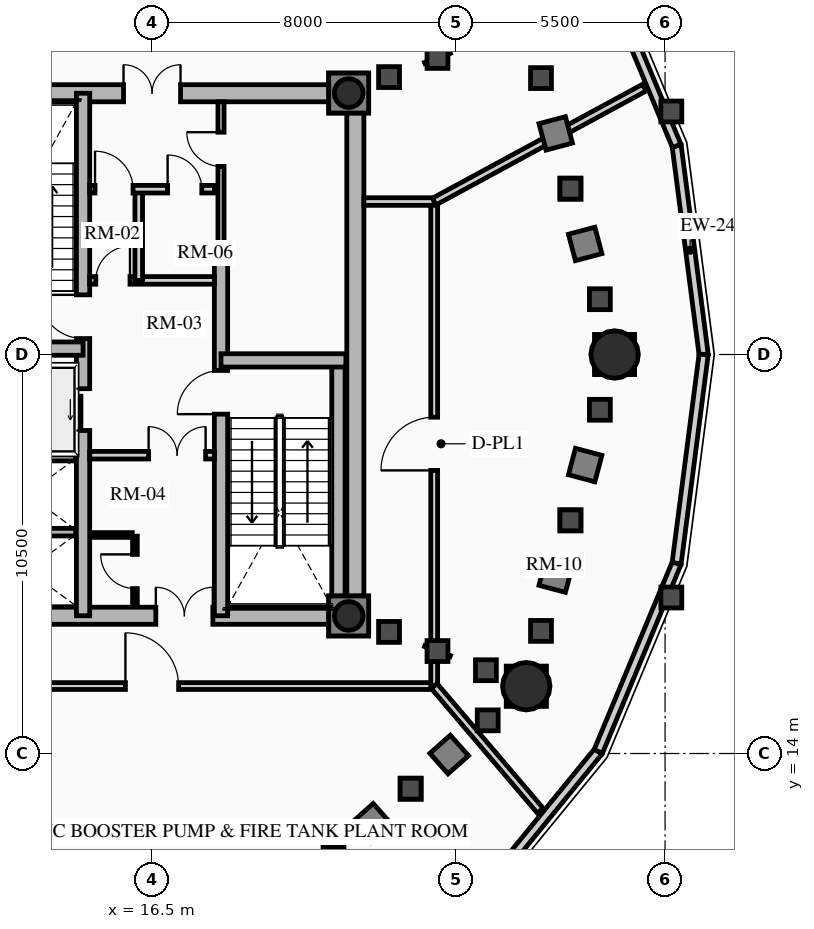
"""IFC4 building model, lengths in metres.
Left out: names, types, materials, properties, quantities, classifications, styles, units other than length and angle.
Written with IfcOpenShell. Run it as: python <this file> out.ifc"""

import sys

from ifc_helpers import new_model, si_unit, direction, frame, frame_2d, origin, origin_2d, place, context, subcontext, project, spatial, rectangle, circle, hollow_circle, extrude, source, transform, mapped, element, fill, save


model = new_model("IFC4")
c1 = context("Model", 3, precision=1e-05, world=origin(), true_north=direction((0.0, 1.0)))
c2 = subcontext(c1, "Body", "Model", "MODEL_VIEW")
j1 = project(units=[si_unit("LENGTHUNIT", "METRE"), si_unit("PLANEANGLEUNIT", "RADIAN")], contexts=[c1])
p1 = place(None, origin())
s1 = spatial("IfcSite", under=j1, at=p1, CompositionType="ELEMENT")
p2 = place(p1, origin())
s2 = spatial("IfcBuilding", under=s1, at=p2, CompositionType="ELEMENT")
p3 = place(p2, frame((0.0, 0.0, 147.1)))
s3 = spatial("IfcBuildingStorey", under=s2, at=p3, CompositionType="ELEMENT", Elevation=147.1)
p4 = place(p3, frame((21.85, 17.4, 0.0), z_axis=(0.0, 0.0, 1.0), x_axis=(0.0, 1.0, 0.0)))
e1 = element("IfcWall", 1, at=p4, inside=s3, PredefinedType="SHEAR", context=c2, shape_type="SweptSolid", body=[
    extrude(rectangle(XDim=14.2, YDim=0.45, at=frame_2d((7.1, 0.0))), origin(), (0.0, 0.0, 1.0), 4.5),
])
p5 = place(p3, frame((11.15, 17.625, 0.0), z_axis=(0.0, 0.0, 1.0), x_axis=(1.0, 0.0, 0.0)))
e2 = element("IfcWall", 2, at=p5, inside=s3, PredefinedType="SHEAR", context=c2, shape_type="SweptSolid", body=[
    extrude(rectangle(XDim=10.7, YDim=0.45, at=frame_2d((5.35, 0.0))), origin(), (0.0, 0.0, 1.0), 4.5),
])
m1 = source(origin(), c2, "Body", "SweptSolid", [
    extrude(rectangle(XDim=1.5, YDim=2.02, at=frame_2d((0.75, 1.01))), frame((0.0, 0.235, 0.0), z_axis=(0.0, -1.0, 0.0), x_axis=(1.0, 0.0, 0.0)), (0.0, 0.0, 1.0), 0.47),
])
p6 = place(p5, frame((5.45, 0.0, 0.0)))
e3 = element("IfcOpeningElement", 3, at=p6, cuts=e2, PredefinedType="OPENING", context=c2, shape_type="MappedRepresentation", body=[
    mapped(m1, transform((0.0, 0.0, 0.0), x_axis=(1.0, 0.0, 0.0), y_axis=(0.0, 1.0, 0.0), z_axis=(0.0, 0.0, 1.0), scale=1.0)),
])
p7 = place(p3, frame((11.15, 31.375, 0.0), z_axis=(0.0, 0.0, 1.0), x_axis=(1.0, 0.0, 0.0)))
e4 = element("IfcWall", 4, at=p7, inside=s3, PredefinedType="SHEAR", context=c2, shape_type="SweptSolid", body=[
    extrude(rectangle(XDim=10.7, YDim=0.45, at=frame_2d((5.35, 0.0))), origin(), (0.0, 0.0, 1.0), 4.5),
])
p8 = place(p7, frame((4.6, 0.0, 0.0)))
e5 = element("IfcOpeningElement", 5, at=p8, cuts=e4, PredefinedType="OPENING", context=c2, shape_type="MappedRepresentation", body=[
    mapped(m1, transform((0.0, 0.0, 0.0), x_axis=(1.0, 0.0, 0.0), y_axis=(0.0, 1.0, 0.0), z_axis=(0.0, 0.0, 1.0), scale=1.0)),
])
p9 = place(p3, frame((14.685, 17.625, 0.0), z_axis=(0.0, 0.0, 1.0), x_axis=(0.0, 1.0, 0.0)))
e6 = element("IfcWall", 6, at=p9, inside=s3, PredefinedType="SHEAR", context=c2, shape_type="SweptSolid", body=[
    extrude(rectangle(XDim=13.75, YDim=0.35, at=frame_2d((6.875, 0.0))), origin(), (0.0, 0.0, 1.0), 4.5),
])
m2 = source(origin(), c2, "Body", "SweptSolid", [
    extrude(rectangle(XDim=1.1, YDim=2.015, at=frame_2d((0.55, 1.007))), frame((0.0, 0.185, 0.0), z_axis=(0.0, -1.0, 0.0), x_axis=(1.0, 0.0, 0.0)), (0.0, 0.0, 1.0), 0.37),
])
p10 = place(p9, frame((4.875, 0.0, 0.0)))
e7 = element("IfcOpeningElement", 7, at=p10, cuts=e6, PredefinedType="OPENING", context=c2, shape_type="MappedRepresentation", body=[
    mapped(m2, transform((0.0, 0.0, 0.0), x_axis=(1.0, 0.0, 0.0), y_axis=(0.0, 1.0, 0.0), z_axis=(0.0, 0.0, 1.0), scale=1.0)),
])
m3 = source(origin(), c2, "Body", "SweptSolid", [
    extrude(rectangle(XDim=1.15, YDim=2.02, at=frame_2d((0.575, 1.01))), frame((0.0, 0.185, 0.0), z_axis=(0.0, -1.0, 0.0), x_axis=(1.0, 0.0, 0.0)), (0.0, 0.0, 1.0), 0.37),
])
p11 = place(p9, frame((7.295, 0.0, 0.0)))
e8 = element("IfcOpeningElement", 8, at=p11, cuts=e6, PredefinedType="OPENING", context=c2, shape_type="MappedRepresentation", body=[
    mapped(m3, transform((0.0, 0.0, 0.0), x_axis=(1.0, 0.0, 0.0), y_axis=(0.0, 1.0, 0.0), z_axis=(0.0, 0.0, 1.0), scale=1.0)),
])
p12 = place(p3, frame((18.315, 17.625, 0.0), z_axis=(0.0, 0.0, 1.0), x_axis=(0.0, 1.0, 0.0)))
e9 = element("IfcWall", 9, at=p12, inside=s3, PredefinedType="SHEAR", context=c2, shape_type="SweptSolid", body=[
    extrude(rectangle(XDim=9.625, YDim=0.35, at=frame_2d((4.812, 0.0))), origin(), (0.0, 0.0, 1.0), 4.5),
])
p13 = place(p12, frame((5.305, 0.0, 0.0)))
e10 = element("IfcOpeningElement", 10, at=p13, cuts=e9, PredefinedType="OPENING", context=c2, shape_type="MappedRepresentation", body=[
    mapped(m3, transform((0.0, 0.0, 0.0), x_axis=(1.0, 0.0, 0.0), y_axis=(0.0, 1.0, 0.0), z_axis=(0.0, 0.0, 1.0), scale=1.0)),
])
p14 = place(p3, frame((11.4, 24.655, 0.0), z_axis=(0.0, 0.0, 1.0), x_axis=(1.0, 0.0, 0.0)))
e11 = element("IfcWall", 11, at=p14, inside=s3, PredefinedType="SHEAR", context=c2, shape_type="SweptSolid", body=[
    extrude(rectangle(XDim=3.285, YDim=0.35, at=frame_2d((1.643, 0.0))), origin(), (0.0, 0.0, 1.0), 4.5),
])
p15 = place(p3, frame((21.405, 17.625, 0.0), z_axis=(0.0, 0.0, 1.0), x_axis=(0.0, 1.0, 0.0)))
e12 = element("IfcWall", 12, at=p15, inside=s3, PredefinedType="SHEAR", context=c2, shape_type="SweptSolid", body=[
    extrude(rectangle(XDim=6.72, YDim=0.35, at=frame_2d((3.36, 0.0))), origin(), (0.0, 0.0, 1.0), 4.5),
])
p16 = place(p3, frame((18.315, 24.345, 0.0), z_axis=(0.0, 0.0, 1.0), x_axis=(1.0, 0.0, 0.0)))
e13 = element("IfcWall", 13, at=p16, inside=s3, PredefinedType="SHEAR", context=c2, shape_type="SweptSolid", body=[
    extrude(rectangle(XDim=3.285, YDim=0.35, at=frame_2d((1.643, 0.0))), origin(), (0.0, 0.0, 1.0), 4.5),
])
for number, where, z_axis, x_axis in (
    (14, (21.675, 17.62, 0.0), (0.0, 0.0, 1.0), (1.0, 0.0, 0.0)),
    (15, (21.675, 31.38, 0.0), (0.0, 0.0, 1.0), (1.0, 0.0, 0.0)),
):
    element("IfcColumn", number, at=place(p3, frame(where, z_axis=z_axis, x_axis=x_axis)), inside=s3, PredefinedType="COLUMN", context=c2, shape_type="SweptSolid", body=[
        extrude(hollow_circle(Radius=0.38, WallThickness=0.032, at=origin_2d()), origin(), (0.0, 0.0, 1.0), 4.5),
    ])
for number, where, z_axis, x_axis in (
    (16, (28.672, 24.5, 0.0), (0.0, 0.0, 1.0), (1.0, 0.0, 0.0)),
    (17, (26.347, 15.771, 0.0), (0.0, 0.0, 1.0), (1.0, 0.0, 0.0)),
):
    element("IfcColumn", number, at=place(p3, frame(where, z_axis=z_axis, x_axis=x_axis)), inside=s3, PredefinedType="USERDEFINED", context=c2, shape_type="SweptSolid", body=[
        extrude(circle(Radius=0.625, at=origin_2d()), origin(), (0.0, 0.0, 1.0), 4.5),
    ])
p17 = place(p3, frame((30.305, 29.991, 0.0), z_axis=(0.0, 0.0, 1.0), x_axis=(0.128266533912, -0.991739732126, 0.0)))
e18 = element("IfcWall", 18, at=p17, inside=s3, PredefinedType="SOLIDWALL", context=c2, shape_type="SweptSolid", body=[
    extrude(rectangle(XDim=5.537, YDim=0.24, at=frame_2d((2.769, 0.0))), origin(), (0.0, 0.0, 1.0), 3.636),
])
p18 = place(p3, frame((28.243, 34.945, 0.0), z_axis=(0.0, 0.0, 1.0), x_axis=(0.384259959969, -0.923224936386, 0.0)))
e19 = element("IfcWall", 19, at=p18, inside=s3, PredefinedType="SOLIDWALL", context=c2, shape_type="SweptSolid", body=[
    extrude(rectangle(XDim=5.365, YDim=0.24, at=frame_2d((2.683, 0.0))), origin(), (0.0, 0.0, 1.0), 3.636),
])
p19 = place(p3, frame((28.243, 14.055, 0.0), z_axis=(0.0, 0.0, 1.0), x_axis=(-0.632598524901, -0.774479894053, 0.0)))
e20 = element("IfcWall", 20, at=p19, inside=s3, PredefinedType="SOLIDWALL", context=c2, shape_type="SweptSolid", body=[
    extrude(rectangle(XDim=5.076, YDim=0.24, at=frame_2d((2.538, 0.0))), origin(), (0.0, 0.0, 1.0), 3.636),
])
p20 = place(p3, frame((30.305, 19.009, 0.0), z_axis=(0.0, 0.0, 1.0), x_axis=(-0.384259959969, -0.923224936386, 0.0)))
e21 = element("IfcWall", 21, at=p20, inside=s3, PredefinedType="SOLIDWALL", context=c2, shape_type="SweptSolid", body=[
    extrude(rectangle(XDim=5.365, YDim=0.24, at=frame_2d((2.683, 0.0))), origin(), (0.0, 0.0, 1.0), 3.636),
])
p21 = place(p3, frame((31.015, 24.5, 0.0), z_axis=(0.0, 0.0, 1.0), x_axis=(-0.128266533912, -0.991739732126, 0.0)))
e22 = element("IfcWall", 22, at=p21, inside=s3, PredefinedType="SOLIDWALL", context=c2, shape_type="SweptSolid", body=[
    extrude(rectangle(XDim=5.537, YDim=0.24, at=frame_2d((2.769, 0.0))), origin(), (0.0, 0.0, 1.0), 3.636),
])
for number, where, z_axis, x_axis in (
    (23, (11.52, 21.8, 0.0), (0.0, 0.0, 1.0), (1.0, 0.0, 0.0)),
    (24, (11.52, 19.825, 0.0), (0.0, 0.0, 1.0), (1.0, 0.0, 0.0)),
):
    element("IfcWall", number, at=place(p3, frame(where, z_axis=z_axis, x_axis=x_axis)), inside=s3, PredefinedType="SHEAR", context=c2, shape_type="SweptSolid", body=[
        extrude(rectangle(XDim=2.97, YDim=0.2, at=frame_2d((1.485, 0.0))), origin(), (0.0, 0.0, 1.0), 4.5),
    ])
p22 = place(p3, frame((14.86, 21.85, 0.0), z_axis=(0.0, 0.0, 1.0), x_axis=(1.0, 0.0, 0.0)))
e25 = element("IfcWall", 25, at=p22, inside=s3, PredefinedType="PARTITIONING", context=c2, shape_type="SweptSolid", body=[
    extrude(rectangle(XDim=3.28, YDim=0.2, at=frame_2d((1.64, 0.0))), origin(), (0.0, 0.0, 1.0), 4.265),
])
m4 = source(origin(), c2, "Body", "SweptSolid", [
    extrude(rectangle(XDim=1.5, YDim=2.02, at=frame_2d((0.75, 1.01))), frame((0.0, 0.11, 0.0), z_axis=(0.0, -1.0, 0.0), x_axis=(1.0, 0.0, 0.0)), (0.0, 0.0, 1.0), 0.22),
])
p23 = place(p22, frame((1.55, 0.0, 0.0)))
e26 = element("IfcOpeningElement", 26, at=p23, cuts=e25, PredefinedType="OPENING", context=c2, shape_type="MappedRepresentation", body=[
    mapped(m4, transform((0.0, 0.0, 0.0), x_axis=(1.0, 0.0, 0.0), y_axis=(0.0, 1.0, 0.0), z_axis=(0.0, 0.0, 1.0), scale=1.0)),
])
p24 = place(p3, frame((14.86, 26.45, 0.0), z_axis=(0.0, 0.0, 1.0), x_axis=(1.0, 0.0, 0.0)))
e27 = element("IfcWall", 27, at=p24, inside=s3, PredefinedType="PARTITIONING", context=c2, shape_type="SweptSolid", body=[
    extrude(rectangle(XDim=3.28, YDim=0.2, at=frame_2d((1.64, 0.0))), origin(), (0.0, 0.0, 1.0), 4.265),
])
m5 = source(origin(), c2, "Body", "SweptSolid", [
    extrude(rectangle(XDim=0.9, YDim=2.005, at=frame_2d((0.45, 1.002))), frame((0.0, 0.11, 0.0), z_axis=(0.0, -1.0, 0.0), x_axis=(1.0, 0.0, 0.0)), (0.0, 0.0, 1.0), 0.22),
])
p25 = place(p24, frame((0.16, 0.0, 0.0)))
e28 = element("IfcOpeningElement", 28, at=p25, cuts=e27, PredefinedType="OPENING", context=c2, shape_type="MappedRepresentation", body=[
    mapped(m5, transform((0.0, 0.0, 0.0), x_axis=(1.0, 0.0, 0.0), y_axis=(0.0, 1.0, 0.0), z_axis=(0.0, 0.0, 1.0), scale=1.0)),
])
p26 = place(p3, frame((16.15, 26.45, 0.0), z_axis=(0.0, 0.0, 1.0), x_axis=(0.0, 1.0, 0.0)))
e29 = element("IfcWall", 29, at=p26, inside=s3, PredefinedType="PARTITIONING", context=c2, shape_type="SweptSolid", body=[
    extrude(rectangle(XDim=2.4, YDim=0.2, at=frame_2d((1.2, 0.0))), origin(), (0.0, 0.0, 1.0), 4.265),
])
p27 = place(p3, frame((14.86, 28.85, 0.0), z_axis=(0.0, 0.0, 1.0), x_axis=(1.0, 0.0, 0.0)))
e30 = element("IfcWall", 30, at=p27, inside=s3, PredefinedType="PARTITIONING", context=c2, shape_type="SweptSolid", body=[
    extrude(rectangle(XDim=3.28, YDim=0.2, at=frame_2d((1.64, 0.0))), origin(), (0.0, 0.0, 1.0), 4.265),
])
m6 = source(origin(), c2, "Body", "SweptSolid", [
    extrude(rectangle(XDim=1.0, YDim=2.015, at=frame_2d((0.5, 1.007))), frame((0.0, 0.11, 0.0), z_axis=(0.0, -1.0, 0.0), x_axis=(1.0, 0.0, 0.0)), (0.0, 0.0, 1.0), 0.22),
])
p28 = place(p27, frame((0.14, 0.0, 0.0)))
e31 = element("IfcOpeningElement", 31, at=p28, cuts=e30, PredefinedType="OPENING", context=c2, shape_type="MappedRepresentation", body=[
    mapped(m6, transform((0.0, 0.0, 0.0), x_axis=(1.0, 0.0, 0.0), y_axis=(0.0, 1.0, 0.0), z_axis=(0.0, 0.0, 1.0), scale=1.0)),
])
p29 = place(p27, frame((2.05, 0.0, 0.0)))
e32 = element("IfcOpeningElement", 32, at=p29, cuts=e30, PredefinedType="OPENING", context=c2, shape_type="MappedRepresentation", body=[
    mapped(m5, transform((0.0, 0.0, 0.0), x_axis=(1.0, 0.0, 0.0), y_axis=(0.0, 1.0, 0.0), z_axis=(0.0, 0.0, 1.0), scale=1.0)),
])
p30 = place(p3, frame((16.05, 17.92, 0.0), z_axis=(0.0, 0.0, 1.0), x_axis=(0.0, 1.0, 0.0)))
e33 = element("IfcWall", 33, at=p30, inside=s3, PredefinedType="PARTITIONING", context=c2, shape_type="SweptSolid", body=[
    extrude(rectangle(XDim=1.8, YDim=0.125, at=frame_2d((0.9, 0.0))), origin(), (0.0, 0.0, 1.0), 4.265),
])
m7 = source(origin(), c2, "Body", "SweptSolid", [
    extrude(rectangle(XDim=0.9, YDim=2.005, at=frame_2d((0.45, 1.002))), frame((0.0, 0.073, 0.0), z_axis=(0.0, -1.0, 0.0), x_axis=(1.0, 0.0, 0.0)), (0.0, 0.0, 1.0), 0.145),
])
p31 = place(p30, frame((0.42, 0.0, 0.0)))
e34 = element("IfcOpeningElement", 34, at=p31, cuts=e33, PredefinedType="OPENING", context=c2, shape_type="MappedRepresentation", body=[
    mapped(m7, transform((0.0, 0.0, 0.0), x_axis=(1.0, 0.0, 0.0), y_axis=(0.0, 1.0, 0.0), z_axis=(0.0, 0.0, 1.0), scale=1.0)),
])
p32 = place(p3, frame((14.88, 19.75, 0.0), z_axis=(0.0, 0.0, 1.0), x_axis=(1.0, 0.0, 0.0)))
e35 = element("IfcWall", 35, at=p32, inside=s3, PredefinedType="PARTITIONING", context=c2, shape_type="SweptSolid", body=[
    extrude(rectangle(XDim=1.1, YDim=0.125, at=frame_2d((0.55, 0.0))), origin(), (0.0, 0.0, 1.0), 4.265),
])
p33 = place(p3, frame((18.315, 27.25, 0.0), z_axis=(0.0, 0.0, 1.0), x_axis=(0.0, 1.0, 0.0)))
e36 = element("IfcWall", 36, at=p33, inside=s3, PredefinedType="PARTITIONING", context=c2, shape_type="SweptSolid", body=[
    extrude(rectangle(XDim=3.9, YDim=0.16, at=frame_2d((1.95, 0.0))), origin(), (0.0, 0.0, 1.0), 4.265),
])
m8 = source(origin(), c2, "Body", "SweptSolid", [
    extrude(rectangle(XDim=0.9, YDim=2.005, at=frame_2d((0.45, 1.002))), frame((0.0, 0.09, 0.0), z_axis=(0.0, -1.0, 0.0), x_axis=(1.0, 0.0, 0.0)), (0.0, 0.0, 1.0), 0.18),
])
p34 = place(p33, frame((2.2, 0.0, 0.0)))
e37 = element("IfcOpeningElement", 37, at=p34, cuts=e36, PredefinedType="OPENING", context=c2, shape_type="MappedRepresentation", body=[
    mapped(m8, transform((0.0, 0.0, 0.0), x_axis=(1.0, 0.0, 0.0), y_axis=(0.0, 1.0, 0.0), z_axis=(0.0, 0.0, 1.0), scale=1.0)),
])
p35 = place(p3, frame((9.075, 15.775, 0.0), z_axis=(0.0, 0.0, 1.0), x_axis=(1.0, 0.0, 0.0)))
e38 = element("IfcWall", 38, at=p35, inside=s3, PredefinedType="PARTITIONING", context=c2, shape_type="SweptSolid", body=[
    extrude(rectangle(XDim=14.85, YDim=0.18, at=frame_2d((7.425, 0.0))), origin(), (0.0, 0.0, 1.0), 3.556),
])
m9 = source(origin(), c2, "Body", "SweptSolid", [
    extrude(rectangle(XDim=1.4, YDim=2.02, at=frame_2d((0.7, 1.01))), frame((0.0, 0.1, 0.0), z_axis=(0.0, -1.0, 0.0), x_axis=(1.0, 0.0, 0.0)), (0.0, 0.0, 1.0), 0.2),
])
p36 = place(p35, frame((6.725, 0.0, 0.0)))
e39 = element("IfcOpeningElement", 39, at=p36, cuts=e38, PredefinedType="OPENING", context=c2, shape_type="MappedRepresentation", body=[
    mapped(m9, transform((0.0, 0.0, 0.0), x_axis=(1.0, 0.0, 0.0), y_axis=(0.0, 1.0, 0.0), z_axis=(0.0, 0.0, 1.0), scale=1.0)),
])
p37 = place(p3, frame((23.925, 15.775, 0.0), z_axis=(0.0, 0.0, 1.0), x_axis=(0.0, 1.0, 0.0)))
e40 = element("IfcWall", 40, at=p37, inside=s3, PredefinedType="PARTITIONING", context=c2, shape_type="SweptSolid", body=[
    extrude(rectangle(XDim=12.75, YDim=0.18, at=frame_2d((6.375, 0.0))), origin(), (0.0, 0.0, 1.0), 3.556),
])
p38 = place(p37, frame((5.675, 0.0, 0.0)))
e41 = element("IfcOpeningElement", 41, at=p38, cuts=e40, PredefinedType="OPENING", context=c2, shape_type="MappedRepresentation", body=[
    mapped(m9, transform((0.0, 0.0, 0.0), x_axis=(1.0, 0.0, 0.0), y_axis=(0.0, 1.0, 0.0), z_axis=(0.0, 0.0, 1.0), scale=1.0)),
])
p39 = place(p3, frame((22.075, 28.525, 0.0), z_axis=(0.0, 0.0, 1.0), x_axis=(1.0, 0.0, 0.0)))
e42 = element("IfcWall", 42, at=p39, inside=s3, PredefinedType="PARTITIONING", context=c2, shape_type="SweptSolid", body=[
    extrude(rectangle(XDim=1.85, YDim=0.2, at=frame_2d((0.925, 0.0))), origin(), (0.0, 0.0, 1.0), 4.265),
])
p40 = place(p3, frame((23.925, 28.525, 0.0), z_axis=(0.0, 0.0, 1.0), x_axis=(0.879137456905, 0.476568286677, 0.0)))
e43 = element("IfcWall", 43, at=p40, inside=s3, PredefinedType="PARTITIONING", context=c2, shape_type="SweptSolid", body=[
    extrude(rectangle(XDim=6.288, YDim=0.2, at=frame_2d((3.144, 0.0))), origin(), (0.0, 0.0, 1.0), 3.556),
])
p41 = place(p3, frame((23.925, 15.775, 0.0), z_axis=(0.0, 0.0, 1.0), x_axis=(0.648059850105, -0.761589410825, 0.0)))
e44 = element("IfcWall", 44, at=p41, inside=s3, PredefinedType="PARTITIONING", context=c2, shape_type="SweptSolid", body=[
    extrude(rectangle(XDim=4.305, YDim=0.2, at=frame_2d((2.153, 0.0))), origin(), (0.0, 0.0, 1.0), 3.636),
])
m10 = source(origin(), c2, "Body", "SweptSolid", [
    extrude(rectangle(XDim=1.1, YDim=2.015, at=frame_2d((0.55, 1.007))), frame((0.0, 0.025, 0.0), z_axis=(0.0, -1.0, 0.0), x_axis=(1.0, 0.0, 0.0)), (0.0, 0.0, 1.0), 0.05),
])
p42 = place(p10, origin())
e45 = element("IfcDoor", 45, at=p42, inside=s3, OperationType="SLIDING_TO_LEFT", PredefinedType="DOOR", context=c2, shape_type="MappedRepresentation", body=[
    mapped(m10, transform((0.0, 0.0, 0.0), x_axis=(1.0, 0.0, 0.0), y_axis=(0.0, 1.0, 0.0), z_axis=(0.0, 0.0, 1.0), scale=1.0)),
])
fill(e7, e45)
m11 = source(origin(), c2, "Body", "SweptSolid", [
    extrude(rectangle(XDim=1.15, YDim=2.02, at=frame_2d((0.575, 1.01))), frame((0.0, 0.025, 0.0), z_axis=(0.0, -1.0, 0.0), x_axis=(1.0, 0.0, 0.0)), (0.0, 0.0, 1.0), 0.05),
])
p43 = place(p11, origin())
e46 = element("IfcDoor", 46, at=p43, inside=s3, OperationType="SINGLE_SWING_RIGHT", PredefinedType="DOOR", context=c2, shape_type="MappedRepresentation", body=[
    mapped(m11, transform((0.0, 0.0, 0.0), x_axis=(1.0, 0.0, 0.0), y_axis=(0.0, 1.0, 0.0), z_axis=(0.0, 0.0, 1.0), scale=1.0)),
])
fill(e8, e46)
p44 = place(p13, origin())
e47 = element("IfcDoor", 47, at=p44, inside=s3, OperationType="SINGLE_SWING_LEFT", PredefinedType="DOOR", context=c2, shape_type="MappedRepresentation", body=[
    mapped(m11, transform((0.0, 0.0, 0.0), x_axis=(1.0, 0.0, 0.0), y_axis=(0.0, 1.0, 0.0), z_axis=(0.0, 0.0, 1.0), scale=1.0)),
])
fill(e10, e47)
m12 = source(origin(), c2, "Body", "SweptSolid", [
    extrude(rectangle(XDim=1.5, YDim=2.02, at=frame_2d((0.75, 1.01))), frame((0.0, 0.025, 0.0), z_axis=(0.0, -1.0, 0.0), x_axis=(1.0, 0.0, 0.0)), (0.0, 0.0, 1.0), 0.05),
])
p45 = place(p8, origin())
e48 = element("IfcDoor", 48, at=p45, inside=s3, OperationType="DOUBLE_DOOR_SINGLE_SWING", PredefinedType="DOOR", context=c2, shape_type="MappedRepresentation", body=[
    mapped(m12, transform((0.0, 0.0, 0.0), x_axis=(1.0, 0.0, 0.0), y_axis=(0.0, 1.0, 0.0), z_axis=(0.0, 0.0, 1.0), scale=1.0)),
])
fill(e5, e48)
p46 = place(p6, origin())
e49 = element("IfcDoor", 49, at=p46, inside=s3, OperationType="DOUBLE_DOOR_SINGLE_SWING", PredefinedType="DOOR", context=c2, shape_type="MappedRepresentation", body=[
    mapped(m12, transform((0.0, 0.0, 0.0), x_axis=(1.0, 0.0, 0.0), y_axis=(0.0, 1.0, 0.0), z_axis=(0.0, 0.0, 1.0), scale=1.0)),
])
fill(e3, e49)
p47 = place(p23, origin())
e50 = element("IfcDoor", 50, at=p47, inside=s3, OperationType="DOUBLE_DOOR_SINGLE_SWING", PredefinedType="DOOR", context=c2, shape_type="MappedRepresentation", body=[
    mapped(m12, transform((0.0, 0.0, 0.0), x_axis=(1.0, 0.0, 0.0), y_axis=(0.0, 1.0, 0.0), z_axis=(0.0, 0.0, 1.0), scale=1.0)),
])
fill(e26, e50)
m13 = source(origin(), c2, "Body", "SweptSolid", [
    extrude(rectangle(XDim=0.9, YDim=2.005, at=frame_2d((0.45, 1.002))), frame((0.0, 0.025, 0.0), z_axis=(0.0, -1.0, 0.0), x_axis=(1.0, 0.0, 0.0)), (0.0, 0.0, 1.0), 0.05),
])
p48 = place(p25, origin())
e51 = element("IfcDoor", 51, at=p48, inside=s3, OperationType="SINGLE_SWING_RIGHT", PredefinedType="DOOR", context=c2, shape_type="MappedRepresentation", body=[
    mapped(m13, transform((0.0, 0.0, 0.0), x_axis=(1.0, 0.0, 0.0), y_axis=(0.0, 1.0, 0.0), z_axis=(0.0, 0.0, 1.0), scale=1.0)),
])
fill(e28, e51)
m14 = source(origin(), c2, "Body", "SweptSolid", [
    extrude(rectangle(XDim=1.0, YDim=2.015, at=frame_2d((0.5, 1.007))), frame((0.0, 0.025, 0.0), z_axis=(0.0, -1.0, 0.0), x_axis=(1.0, 0.0, 0.0)), (0.0, 0.0, 1.0), 0.05),
])
p49 = place(p28, origin())
e52 = element("IfcDoor", 52, at=p49, inside=s3, OperationType="SINGLE_SWING_LEFT", PredefinedType="DOOR", context=c2, shape_type="MappedRepresentation", body=[
    mapped(m14, transform((0.0, 0.0, 0.0), x_axis=(1.0, 0.0, 0.0), y_axis=(0.0, 1.0, 0.0), z_axis=(0.0, 0.0, 1.0), scale=1.0)),
])
fill(e31, e52)
p50 = place(p31, origin())
e53 = element("IfcDoor", 53, at=p50, inside=s3, OperationType="SINGLE_SWING_RIGHT", PredefinedType="DOOR", context=c2, shape_type="MappedRepresentation", body=[
    mapped(m13, transform((0.0, 0.0, 0.0), x_axis=(1.0, 0.0, 0.0), y_axis=(0.0, 1.0, 0.0), z_axis=(0.0, 0.0, 1.0), scale=1.0)),
])
fill(e34, e53)
p51 = place(p29, origin())
e54 = element("IfcDoor", 54, at=p51, inside=s3, OperationType="SINGLE_SWING_LEFT", PredefinedType="DOOR", context=c2, shape_type="MappedRepresentation", body=[
    mapped(m13, transform((0.0, 0.0, 0.0), x_axis=(1.0, 0.0, 0.0), y_axis=(0.0, 1.0, 0.0), z_axis=(0.0, 0.0, 1.0), scale=1.0)),
])
fill(e32, e54)
p52 = place(p34, origin())
e55 = element("IfcDoor", 55, at=p52, inside=s3, OperationType="SINGLE_SWING_RIGHT", PredefinedType="DOOR", context=c2, shape_type="MappedRepresentation", body=[
    mapped(m13, transform((0.0, 0.0, 0.0), x_axis=(1.0, 0.0, 0.0), y_axis=(0.0, 1.0, 0.0), z_axis=(0.0, 0.0, 1.0), scale=1.0)),
])
fill(e37, e55)
m15 = source(origin(), c2, "Body", "SweptSolid", [
    extrude(rectangle(XDim=1.4, YDim=2.02, at=frame_2d((0.7, 1.01))), frame((0.0, 0.025, 0.0), z_axis=(0.0, -1.0, 0.0), x_axis=(1.0, 0.0, 0.0)), (0.0, 0.0, 1.0), 0.05),
])
p53 = place(p36, origin())
e56 = element("IfcDoor", 56, at=p53, inside=s3, OperationType="SINGLE_SWING_LEFT", PredefinedType="DOOR", context=c2, shape_type="MappedRepresentation", body=[
    mapped(m15, transform((0.0, 0.0, 0.0), x_axis=(1.0, 0.0, 0.0), y_axis=(0.0, 1.0, 0.0), z_axis=(0.0, 0.0, 1.0), scale=1.0)),
])
fill(e39, e56)
p54 = place(p38, origin())
e57 = element("IfcDoor", 57, at=p54, inside=s3, OperationType="SINGLE_SWING_LEFT", PredefinedType="DOOR", context=c2, shape_type="MappedRepresentation", body=[
    mapped(m15, transform((0.0, 0.0, 0.0), x_axis=(1.0, 0.0, 0.0), y_axis=(0.0, 1.0, 0.0), z_axis=(0.0, 0.0, 1.0), scale=1.0)),
])
fill(e41, e57)
save(model, sys.argv[1])
